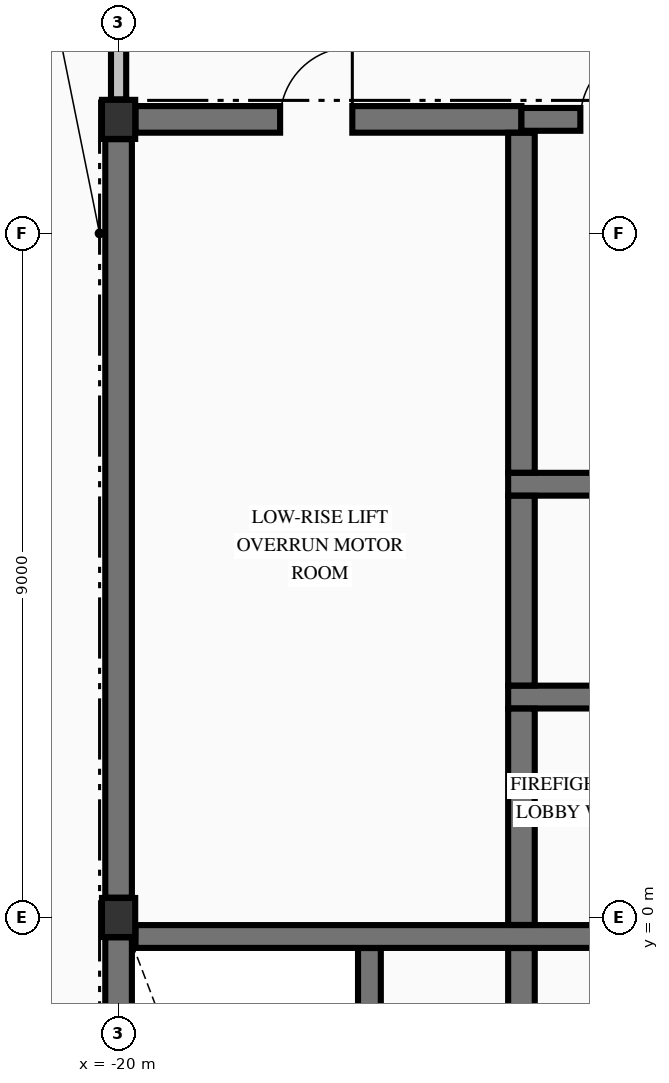
"""IFC4 building model, lengths in metres.
Left out: names, types, materials, properties, quantities, classifications, styles, units other than length and angle.
Written with IfcOpenShell. Run it as: python <this file> out.ifc"""

import sys

from ifc_helpers import new_model, si_unit, direction, frame, frame_2d, origin, origin_2d, place, context, subcontext, project, spatial, rectangle, i_section, extrude, element, fill, save


model = new_model("IFC4")
c1 = context("Model", 3, precision=1e-05, world=origin(), true_north=direction((0.0, 1.0)))
c2 = subcontext(c1, "Body", "Model", "MODEL_VIEW")
j1 = project(units=[si_unit("LENGTHUNIT", "METRE"), si_unit("PLANEANGLEUNIT", "RADIAN")], contexts=[c1])
p1 = place(None, origin())
s1 = spatial("IfcSite", under=j1, at=p1, CompositionType="ELEMENT")
p2 = place(p1, origin())
s2 = spatial("IfcBuilding", under=s1, at=p2, CompositionType="ELEMENT")
p3 = place(p2, frame((0.0, 0.0, 82.18)))
s3 = spatial("IfcBuildingStorey", under=s2, at=p3, CompositionType="ELEMENT", Elevation=82.18)
for number, where, z_axis, x_axis in (
    (1, (-20.0, 10.5, -0.425), (0.0, 0.0, 1.0), (1.0, 0.0, 0.0)),
    (2, (-20.0, 0.0, -0.425), (0.0, 0.0, 1.0), (1.0, 0.0, 0.0)),
):
    element("IfcColumn", number, at=place(p3, frame(where, z_axis=z_axis, x_axis=x_axis)), inside=s3, PredefinedType="COLUMN", context=c2, shape_type="SweptSolid", body=[
        extrude(i_section(OverallWidth=0.437, OverallDepth=0.514, WebThickness=0.061, FlangeThickness=0.097, FilletRadius=0.015, at=origin_2d()), origin(), (0.0, 0.0, 1.0), 4.76),
    ])
p4 = place(p3, frame((-19.778, -0.25, 0.0), z_axis=(0.0, 0.0, 1.0), x_axis=(1.0, 0.0, 0.0)))
e3 = element("IfcWall", 3, at=p4, inside=s3, PredefinedType="SHEAR", context=c2, shape_type="SweptSolid", body=[
    extrude(rectangle(XDim=8.555, YDim=0.3, at=frame_2d((4.278, 0.0))), origin(), (0.0, 0.0, 1.0), 4.335),
])
p5 = place(p4, frame((6.077, 0.0, 0.0)))
e4 = element("IfcOpeningElement", 4, at=p5, cuts=e3, PredefinedType="OPENING", context=c2, shape_type="SweptSolid", body=[
    extrude(rectangle(XDim=1.1, YDim=2.15, at=frame_2d((0.55, 1.075))), frame((0.0, 0.16, 0.0), z_axis=(0.0, -1.0, 0.0), x_axis=(1.0, 0.0, 0.0)), (0.0, 0.0, 1.0), 0.32),
])
p6 = place(p3, frame((-14.875, 2.9, 0.0), z_axis=(0.0, 0.0, 1.0), x_axis=(1.0, 0.0, 0.0)))
e5 = element("IfcWall", 5, at=p6, inside=s3, PredefinedType="SHEAR", context=c2, shape_type="SweptSolid", body=[
    extrude(rectangle(XDim=4.025, YDim=0.3, at=frame_2d((2.012, 0.0))), origin(), (0.0, 0.0, 1.0), 4.335),
])
p7 = place(p6, frame((2.075, 0.0, 0.0)))
e6 = element("IfcOpeningElement", 6, at=p7, cuts=e5, PredefinedType="OPENING", context=c2, shape_type="SweptSolid", body=[
    extrude(rectangle(XDim=1.1, YDim=2.2, at=frame_2d((0.55, 1.1))), frame((0.0, 0.16, 0.0), z_axis=(0.0, -1.0, 0.0), x_axis=(1.0, 0.0, 0.0)), (0.0, 0.0, 1.0), 0.32),
])
p8 = place(p3, frame((-14.875, 5.7, 0.0), z_axis=(0.0, 0.0, 1.0), x_axis=(1.0, 0.0, 0.0)))
e7 = element("IfcWall", 7, at=p8, inside=s3, PredefinedType="SHEAR", context=c2, shape_type="SweptSolid", body=[
    extrude(rectangle(XDim=4.025, YDim=0.3, at=frame_2d((2.012, 0.0))), origin(), (0.0, 0.0, 1.0), 4.335),
])
p9 = place(p3, frame((-19.778, 10.5, 0.0), z_axis=(0.0, 0.0, 1.0), x_axis=(1.0, 0.0, 0.0)))
e8 = element("IfcWall", 8, at=p9, inside=s3, PredefinedType="SHEAR", context=c2, shape_type="SweptSolid", body=[
    extrude(rectangle(XDim=5.078, YDim=0.35, at=frame_2d((2.539, 0.0))), origin(), (0.0, 0.0, 1.0), 4.335),
])
p10 = place(p9, frame((1.903, 0.0, 0.0)))
e9 = element("IfcOpeningElement", 9, at=p10, cuts=e8, PredefinedType="OPENING", context=c2, shape_type="SweptSolid", body=[
    extrude(rectangle(XDim=0.95, YDim=2.02, at=frame_2d((0.475, 1.01))), frame((0.0, 0.185, 0.0), z_axis=(0.0, -1.0, 0.0), x_axis=(1.0, 0.0, 0.0)), (0.0, 0.0, 1.0), 0.37),
])
p11 = place(p3, frame((-14.7, 10.5, 0.0), z_axis=(0.0, 0.0, 1.0), x_axis=(1.0, 0.0, 0.0)))
e10 = element("IfcWall", 10, at=p11, inside=s3, PredefinedType="SHEAR", context=c2, shape_type="SweptSolid", body=[
    extrude(rectangle(XDim=3.478, YDim=0.3, at=frame_2d((1.739, 0.0))), origin(), (0.0, 0.0, 1.0), 4.335),
])
p12 = place(p11, frame((0.775, 0.0, 0.0)))
e11 = element("IfcOpeningElement", 11, at=p12, cuts=e10, PredefinedType="OPENING", context=c2, shape_type="SweptSolid", body=[
    extrude(rectangle(XDim=0.95, YDim=2.02, at=frame_2d((0.475, 1.01))), frame((0.0, 0.16, 0.0), z_axis=(0.0, -1.0, 0.0), x_axis=(1.0, 0.0, 0.0)), (0.0, 0.0, 1.0), 0.32),
])
p13 = place(p3, frame((-20.0, -9.689, 0.0), z_axis=(0.0, 0.0, 1.0), x_axis=(0.0, 1.0, 0.0)))
e12 = element("IfcWall", 12, at=p13, inside=s3, PredefinedType="SHEAR", context=c2, shape_type="SweptSolid", body=[
    extrude(rectangle(XDim=9.428, YDim=0.35, at=frame_2d((4.714, 0.0))), origin(), (0.0, 0.0, 1.0), 4.335),
])
p14 = place(p3, frame((-20.0, 0.261, 0.0), z_axis=(0.0, 0.0, 1.0), x_axis=(0.0, 1.0, 0.0)))
e13 = element("IfcWall", 13, at=p14, inside=s3, PredefinedType="SHEAR", context=c2, shape_type="SweptSolid", body=[
    extrude(rectangle(XDim=9.978, YDim=0.35, at=frame_2d((4.989, 0.0))), origin(), (0.0, 0.0, 1.0), 4.335),
])
p15 = place(p3, frame((-16.7, -9.773, 0.0), z_axis=(0.0, 0.0, 1.0), x_axis=(0.0, 1.0, 0.0)))
e14 = element("IfcWall", 14, at=p15, inside=s3, PredefinedType="SHEAR", context=c2, shape_type="SweptSolid", body=[
    extrude(rectangle(XDim=9.371, YDim=0.3, at=frame_2d((4.686, 0.0))), origin(), (0.0, 0.0, 1.0), 4.335),
])
p16 = place(p3, frame((-14.7, -9.773, 0.0), z_axis=(0.0, 0.0, 1.0), x_axis=(0.0, 1.0, 0.0)))
e15 = element("IfcWall", 15, at=p16, inside=s3, PredefinedType="SHEAR", context=c2, shape_type="SweptSolid", body=[
    extrude(rectangle(XDim=9.371, YDim=0.35, at=frame_2d((4.686, 0.0))), origin(), (0.0, 0.0, 1.0), 4.335),
])
p17 = place(p3, frame((-14.7, -0.098, 0.0), z_axis=(0.0, 0.0, 1.0), x_axis=(0.0, 1.0, 0.0)))
e16 = element("IfcWall", 16, at=p17, inside=s3, PredefinedType="SHEAR", context=c2, shape_type="SweptSolid", body=[
    extrude(rectangle(XDim=2.846, YDim=0.35, at=frame_2d((1.423, 0.0))), origin(), (0.0, 0.0, 1.0), 4.335),
])
p18 = place(p3, frame((-14.7, 3.052, 0.0), z_axis=(0.0, 0.0, 1.0), x_axis=(0.0, 1.0, 0.0)))
e17 = element("IfcWall", 17, at=p18, inside=s3, PredefinedType="SHEAR", context=c2, shape_type="SweptSolid", body=[
    extrude(rectangle(XDim=2.496, YDim=0.35, at=frame_2d((1.248, 0.0))), origin(), (0.0, 0.0, 1.0), 4.335),
])
p19 = place(p3, frame((-14.7, 5.852, 0.0), z_axis=(0.0, 0.0, 1.0), x_axis=(0.0, 1.0, 0.0)))
e18 = element("IfcWall", 18, at=p19, inside=s3, PredefinedType="SHEAR", context=c2, shape_type="SweptSolid", body=[
    extrude(rectangle(XDim=4.471, YDim=0.35, at=frame_2d((2.235, 0.0))), origin(), (0.0, 0.0, 1.0), 4.335),
])
p20 = place(p3, frame((-20.0, 10.763, 0.0), z_axis=(0.0, 0.0, 1.0), x_axis=(0.0, 1.0, 0.0)))
e19 = element("IfcWall", 19, at=p20, inside=s3, PredefinedType="PARTITIONING", context=c2, shape_type="SweptSolid", body=[
    extrude(rectangle(XDim=1.934, YDim=0.2, at=frame_2d((0.967, 0.0))), origin(), (0.0, 0.0, 1.0), 2.127),
])
p21 = place(p12, origin())
e20 = element("IfcDoor", 20, at=p21, inside=s3, OperationType="SINGLE_SWING_RIGHT", PredefinedType="DOOR", context=c2, shape_type="SweptSolid", body=[
    extrude(rectangle(XDim=0.95, YDim=2.02, at=frame_2d((0.475, 1.01))), frame((0.0, 0.025, 0.0), z_axis=(0.0, -1.0, 0.0), x_axis=(1.0, 0.0, 0.0)), (0.0, 0.0, 1.0), 0.05),
])
fill(e11, e20)
p22 = place(p10, origin())
e21 = element("IfcDoor", 21, at=p22, inside=s3, OperationType="SINGLE_SWING_RIGHT", PredefinedType="DOOR", context=c2, shape_type="SweptSolid", body=[
    extrude(rectangle(XDim=0.95, YDim=2.02, at=frame_2d((0.475, 1.01))), frame((0.0, 0.025, 0.0), z_axis=(0.0, -1.0, 0.0), x_axis=(1.0, 0.0, 0.0)), (0.0, 0.0, 1.0), 0.05),
])
fill(e9, e21)
save(model, sys.argv[1])
